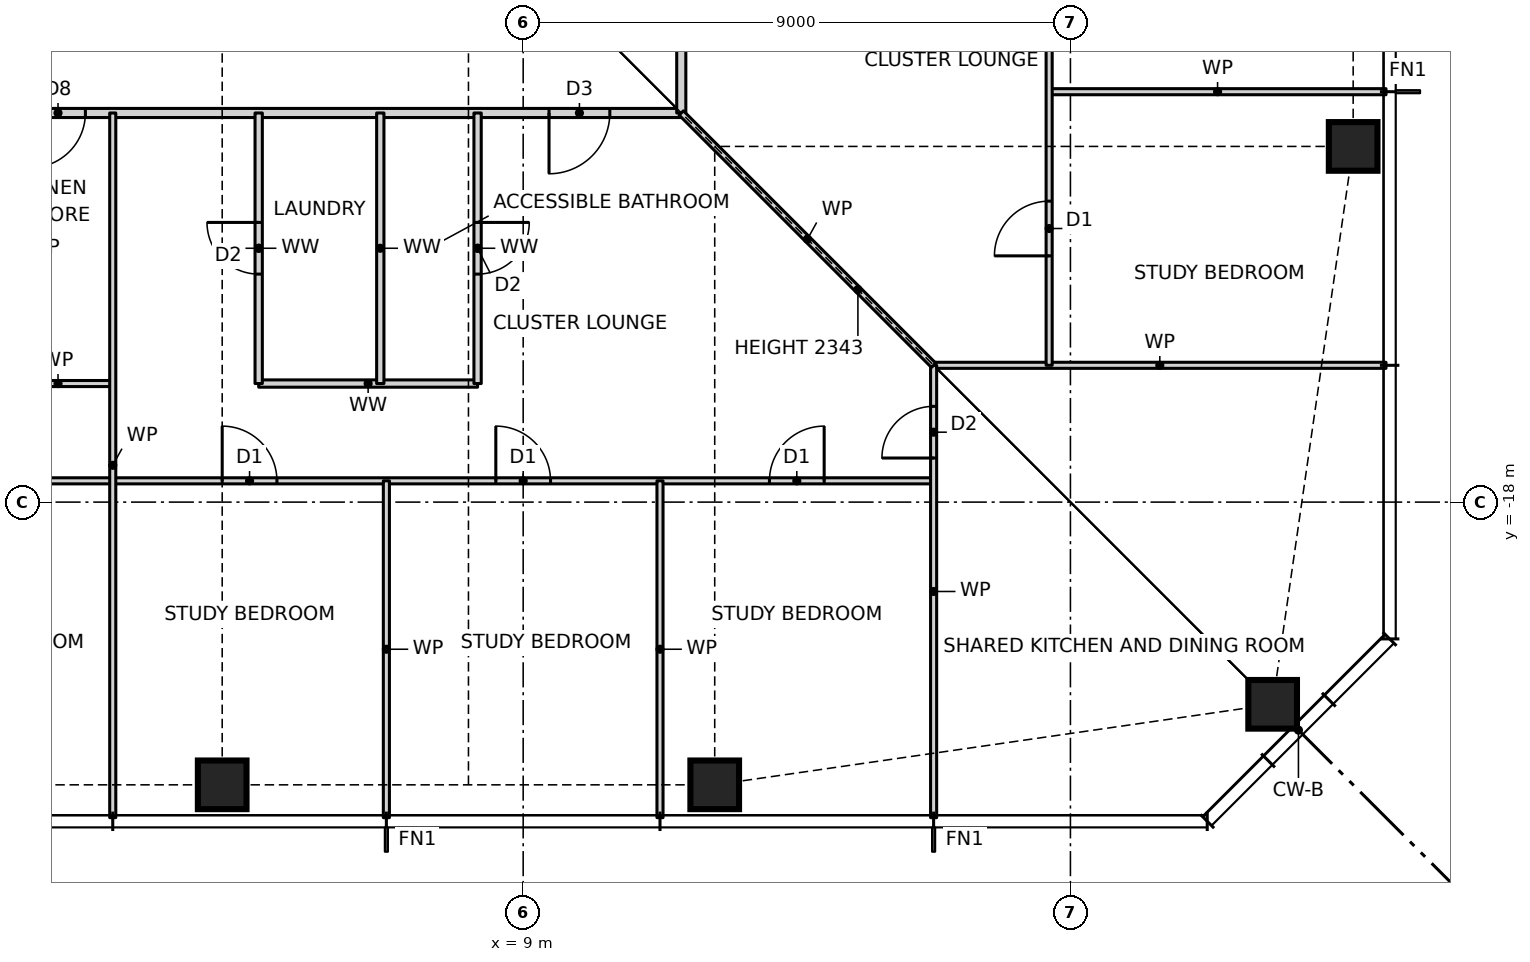
"""IFC4 building model, lengths in metres.
Left out: names, types, materials, properties, quantities, classifications, styles, units other than length and angle.
Written with IfcOpenShell. Run it as: python <this file> out.ifc"""

import sys

from ifc_helpers import new_model, si_unit, direction, frame, frame_2d, origin, origin_2d, place, context, subcontext, project, spatial, rectangle, hollow_rectangle, extrude, element, fill, save


model = new_model("IFC4")
c1 = context("Model", 3, precision=1e-05, world=origin(), true_north=direction((0.0, 1.0)))
c2 = subcontext(c1, "Body", "Model", "MODEL_VIEW")
j1 = project(units=[si_unit("LENGTHUNIT", "METRE"), si_unit("PLANEANGLEUNIT", "RADIAN")], contexts=[c1])
p1 = place(None, origin())
s1 = spatial("IfcSite", under=j1, at=p1, CompositionType="ELEMENT")
p2 = place(p1, origin())
s2 = spatial("IfcBuilding", under=s1, at=p2, CompositionType="ELEMENT")
p3 = place(p2, frame((0.0, 0.0, 60.5)))
s3 = spatial("IfcBuildingStorey", under=s2, at=p3, CompositionType="ELEMENT", Elevation=60.5)
for number, where, z_axis, x_axis in (
    (1, (4.05, -22.65, 0.0), (0.0, 0.0, 1.0), (1.0, 0.0, 0.0)),
    (2, (12.15, -22.65, 0.0), (0.0, 0.0, 1.0), (1.0, 0.0, 0.0)),
    (3, (21.326, -21.326, 0.0), (0.0, 0.0, 1.0), (1.0, 0.0, 0.0)),
    (4, (22.65, -12.15, 0.0), (0.0, 0.0, 1.0), (1.0, 0.0, 0.0)),
):
    element("IfcColumn", number, at=place(p3, frame(where, z_axis=z_axis, x_axis=x_axis)), inside=s3, PredefinedType="COLUMN", context=c2, shape_type="SweptSolid", body=[
        extrude(hollow_rectangle(XDim=0.8, YDim=0.8, WallThickness=0.09, at=origin_2d()), origin(), (0.0, 0.0, 1.0), 3.5),
    ])
p4 = place(p3, frame((-15.75, -17.65, 0.0), z_axis=(0.0, 0.0, 1.0), x_axis=(1.0, 0.0, 0.0)))
e5 = element("IfcWall", 5, at=p4, inside=s3, PredefinedType="PARTITIONING", context=c2, shape_type="SweptSolid", body=[
    extrude(rectangle(XDim=31.5, YDim=0.1, at=frame_2d((15.75, 0.0))), origin(), (0.0, 0.0, 1.0), 3.27),
])
p5 = place(p4, frame((1.8, 0.0, 0.0)))
e6 = element("IfcOpeningElement", 6, at=p5, cuts=e5, PredefinedType="OPENING", context=c2, shape_type="SweptSolid", body=[
    extrude(rectangle(XDim=0.9, YDim=2.1, at=frame_2d((0.45, 1.05))), frame((0.0, 0.06, 0.0), z_axis=(0.0, -1.0, 0.0), x_axis=(1.0, 0.0, 0.0)), (0.0, 0.0, 1.0), 0.12),
])
p6 = place(p4, frame((6.3, 0.0, 0.0)))
e7 = element("IfcOpeningElement", 7, at=p6, cuts=e5, PredefinedType="OPENING", context=c2, shape_type="SweptSolid", body=[
    extrude(rectangle(XDim=0.9, YDim=2.1, at=frame_2d((0.45, 1.05))), frame((0.0, 0.06, 0.0), z_axis=(0.0, -1.0, 0.0), x_axis=(1.0, 0.0, 0.0)), (0.0, 0.0, 1.0), 0.12),
])
p7 = place(p4, frame((10.8, 0.0, 0.0)))
e8 = element("IfcOpeningElement", 8, at=p7, cuts=e5, PredefinedType="OPENING", context=c2, shape_type="SweptSolid", body=[
    extrude(rectangle(XDim=0.9, YDim=2.1, at=frame_2d((0.45, 1.05))), frame((0.0, 0.06, 0.0), z_axis=(0.0, -1.0, 0.0), x_axis=(1.0, 0.0, 0.0)), (0.0, 0.0, 1.0), 0.12),
])
p8 = place(p4, frame((15.3, 0.0, 0.0)))
e9 = element("IfcOpeningElement", 9, at=p8, cuts=e5, PredefinedType="OPENING", context=c2, shape_type="SweptSolid", body=[
    extrude(rectangle(XDim=0.9, YDim=2.1, at=frame_2d((0.45, 1.05))), frame((0.0, 0.06, 0.0), z_axis=(0.0, -1.0, 0.0), x_axis=(1.0, 0.0, 0.0)), (0.0, 0.0, 1.0), 0.12),
])
p9 = place(p4, frame((19.8, 0.0, 0.0)))
e10 = element("IfcOpeningElement", 10, at=p9, cuts=e5, PredefinedType="OPENING", context=c2, shape_type="SweptSolid", body=[
    extrude(rectangle(XDim=0.9, YDim=2.1, at=frame_2d((0.45, 1.05))), frame((0.0, 0.06, 0.0), z_axis=(0.0, -1.0, 0.0), x_axis=(1.0, 0.0, 0.0)), (0.0, 0.0, 1.0), 0.12),
])
p10 = place(p4, frame((24.3, 0.0, 0.0)))
e11 = element("IfcOpeningElement", 11, at=p10, cuts=e5, PredefinedType="OPENING", context=c2, shape_type="SweptSolid", body=[
    extrude(rectangle(XDim=0.9, YDim=2.1, at=frame_2d((0.45, 1.05))), frame((0.0, 0.06, 0.0), z_axis=(0.0, -1.0, 0.0), x_axis=(1.0, 0.0, 0.0)), (0.0, 0.0, 1.0), 0.12),
])
p11 = place(p4, frame((28.8, 0.0, 0.0)))
e12 = element("IfcOpeningElement", 12, at=p11, cuts=e5, PredefinedType="OPENING", context=c2, shape_type="SweptSolid", body=[
    extrude(rectangle(XDim=0.9, YDim=2.1, at=frame_2d((0.45, 1.05))), frame((0.0, 0.06, 0.0), z_axis=(0.0, -1.0, 0.0), x_axis=(1.0, 0.0, 0.0)), (0.0, 0.0, 1.0), 0.12),
])
p12 = place(p3, frame((0.45, -16.05, 0.0), z_axis=(0.0, 0.0, 1.0), x_axis=(1.0, 0.0, 0.0)))
e13 = element("IfcWall", 13, at=p12, inside=s3, PredefinedType="PARTITIONING", context=c2, shape_type="SweptSolid", body=[
    extrude(rectangle(XDim=1.8, YDim=0.1, at=frame_2d((0.9, 0.0))), origin(), (0.0, 0.0, 1.0), 3.27),
])
p13 = place(p3, frame((4.65, -16.05, 0.0), z_axis=(0.0, 0.0, 1.0), x_axis=(1.0, 0.0, 0.0)))
e14 = element("IfcWall", 14, at=p13, inside=s3, PredefinedType="PARTITIONING", context=c2, shape_type="SweptSolid", body=[
    extrude(rectangle(XDim=3.6, YDim=0.12, at=frame_2d((1.8, 0.0))), origin(), (0.0, 0.0, 1.0), 3.27),
])
p14 = place(p3, frame((15.75, -15.75, 0.0), z_axis=(0.0, 0.0, 1.0), x_axis=(1.0, 0.0, 0.0)))
e15 = element("IfcWall", 15, at=p14, inside=s3, PredefinedType="PARTITIONING", context=c2, shape_type="SweptSolid", body=[
    extrude(rectangle(XDim=7.44, YDim=0.1, at=frame_2d((3.72, 0.0))), origin(), (0.0, 0.0, 1.0), 3.27),
])
p15 = place(p3, frame((-11.6, -11.6, 0.0), z_axis=(0.0, 0.0, 1.0), x_axis=(1.0, 0.0, 0.0)))
e16 = element("IfcWall", 16, at=p15, inside=s3, PredefinedType="PARTITIONING", context=c2, shape_type="SweptSolid", body=[
    extrude(rectangle(XDim=23.2, YDim=0.15, at=frame_2d((11.6, 0.0))), origin(), (0.0, 0.0, 1.0), 3.27),
])
p16 = place(p15, frame((2.655, 0.0, 0.0)))
e17 = element("IfcOpeningElement", 17, at=p16, cuts=e16, PredefinedType="OPENING", context=c2, shape_type="SweptSolid", body=[
    extrude(rectangle(XDim=1.0, YDim=2.1, at=frame_2d((0.5, 1.05))), frame((0.0, 0.085, 0.0), z_axis=(0.0, -1.0, 0.0), x_axis=(1.0, 0.0, 0.0)), (0.0, 0.0, 1.0), 0.17),
])
p17 = place(p15, frame((12.5, 0.0, 0.0)))
e18 = element("IfcOpeningElement", 18, at=p17, cuts=e16, PredefinedType="OPENING", context=c2, shape_type="SweptSolid", body=[
    extrude(rectangle(XDim=0.9, YDim=2.1, at=frame_2d((0.45, 1.05))), frame((0.0, 0.085, 0.0), z_axis=(0.0, -1.0, 0.0), x_axis=(1.0, 0.0, 0.0)), (0.0, 0.0, 1.0), 0.17),
])
p18 = place(p15, frame((21.025, 0.0, 0.0)))
e19 = element("IfcOpeningElement", 19, at=p18, cuts=e16, PredefinedType="OPENING", context=c2, shape_type="SweptSolid", body=[
    extrude(rectangle(XDim=1.0, YDim=2.1, at=frame_2d((0.5, 1.05))), frame((0.0, 0.085, 0.0), z_axis=(0.0, -1.0, 0.0), x_axis=(1.0, 0.0, 0.0)), (0.0, 0.0, 1.0), 0.17),
])
p19 = place(p3, frame((17.65, -11.25, 0.0), z_axis=(0.0, 0.0, 1.0), x_axis=(1.0, 0.0, 0.0)))
e20 = element("IfcWall", 20, at=p19, inside=s3, PredefinedType="PARTITIONING", context=c2, shape_type="SweptSolid", body=[
    extrude(rectangle(XDim=5.54, YDim=0.1, at=frame_2d((2.77, 0.0))), origin(), (0.0, 0.0, 1.0), 3.27),
])
p20 = place(p3, frame((17.65, -15.75, 0.0), z_axis=(0.0, 0.0, 1.0), x_axis=(0.0, 1.0, 0.0)))
e21 = element("IfcWall", 21, at=p20, inside=s3, PredefinedType="PARTITIONING", context=c2, shape_type="SweptSolid", body=[
    extrude(rectangle(XDim=27.0, YDim=0.1, at=frame_2d((13.5, 0.0))), origin(), (0.0, 0.0, 1.0), 3.27),
])
p21 = place(p20, frame((1.8, 0.0, 0.0)))
e22 = element("IfcOpeningElement", 22, at=p21, cuts=e21, PredefinedType="OPENING", context=c2, shape_type="SweptSolid", body=[
    extrude(rectangle(XDim=0.9, YDim=2.1, at=frame_2d((0.45, 1.05))), frame((0.0, 0.06, 0.0), z_axis=(0.0, -1.0, 0.0), x_axis=(1.0, 0.0, 0.0)), (0.0, 0.0, 1.0), 0.12),
])
p22 = place(p20, frame((6.3, 0.0, 0.0)))
e23 = element("IfcOpeningElement", 23, at=p22, cuts=e21, PredefinedType="OPENING", context=c2, shape_type="SweptSolid", body=[
    extrude(rectangle(XDim=0.9, YDim=2.1, at=frame_2d((0.45, 1.05))), frame((0.0, 0.06, 0.0), z_axis=(0.0, -1.0, 0.0), x_axis=(1.0, 0.0, 0.0)), (0.0, 0.0, 1.0), 0.12),
])
p23 = place(p20, frame((10.8, 0.0, 0.0)))
e24 = element("IfcOpeningElement", 24, at=p23, cuts=e21, PredefinedType="OPENING", context=c2, shape_type="SweptSolid", body=[
    extrude(rectangle(XDim=0.9, YDim=2.1, at=frame_2d((0.45, 1.05))), frame((0.0, 0.06, 0.0), z_axis=(0.0, -1.0, 0.0), x_axis=(1.0, 0.0, 0.0)), (0.0, 0.0, 1.0), 0.12),
])
p24 = place(p20, frame((15.3, 0.0, 0.0)))
e25 = element("IfcOpeningElement", 25, at=p24, cuts=e21, PredefinedType="OPENING", context=c2, shape_type="SweptSolid", body=[
    extrude(rectangle(XDim=0.9, YDim=2.1, at=frame_2d((0.45, 1.05))), frame((0.0, 0.06, 0.0), z_axis=(0.0, -1.0, 0.0), x_axis=(1.0, 0.0, 0.0)), (0.0, 0.0, 1.0), 0.12),
])
p25 = place(p20, frame((19.8, 0.0, 0.0)))
e26 = element("IfcOpeningElement", 26, at=p25, cuts=e21, PredefinedType="OPENING", context=c2, shape_type="SweptSolid", body=[
    extrude(rectangle(XDim=0.9, YDim=2.1, at=frame_2d((0.45, 1.05))), frame((0.0, 0.06, 0.0), z_axis=(0.0, -1.0, 0.0), x_axis=(1.0, 0.0, 0.0)), (0.0, 0.0, 1.0), 0.12),
])
p26 = place(p20, frame((24.3, 0.0, 0.0)))
e27 = element("IfcOpeningElement", 27, at=p26, cuts=e21, PredefinedType="OPENING", context=c2, shape_type="SweptSolid", body=[
    extrude(rectangle(XDim=0.9, YDim=2.1, at=frame_2d((0.45, 1.05))), frame((0.0, 0.06, 0.0), z_axis=(0.0, -1.0, 0.0), x_axis=(1.0, 0.0, 0.0)), (0.0, 0.0, 1.0), 0.12),
])
p27 = place(p3, frame((15.75, -23.19, 0.0), z_axis=(0.0, 0.0, 1.0), x_axis=(0.0, 1.0, 0.0)))
e28 = element("IfcWall", 28, at=p27, inside=s3, PredefinedType="PARTITIONING", context=c2, shape_type="SweptSolid", body=[
    extrude(rectangle(XDim=7.44, YDim=0.1, at=frame_2d((3.72, 0.0))), origin(), (0.0, 0.0, 1.0), 3.27),
])
p28 = place(p27, frame((5.915, 0.0, 0.0)))
e29 = element("IfcOpeningElement", 29, at=p28, cuts=e28, PredefinedType="OPENING", context=c2, shape_type="SweptSolid", body=[
    extrude(rectangle(XDim=0.85, YDim=2.1, at=frame_2d((0.425, 1.05))), frame((0.0, 0.06, 0.0), z_axis=(0.0, -1.0, 0.0), x_axis=(1.0, 0.0, 0.0)), (0.0, 0.0, 1.0), 0.12),
])
p29 = place(p3, frame((11.6, -11.6, 0.0), z_axis=(0.0, 0.0, 1.0), x_axis=(0.0, 1.0, 0.0)))
e30 = element("IfcWall", 30, at=p29, inside=s3, PredefinedType="PARTITIONING", context=c2, shape_type="SweptSolid", body=[
    extrude(rectangle(XDim=24.2, YDim=0.15, at=frame_2d((12.1, 0.0))), origin(), (0.0, 0.0, 1.0), 3.27),
])
p30 = place(p29, frame((16.05, 0.0, 0.0)))
e31 = element("IfcOpeningElement", 31, at=p30, cuts=e30, PredefinedType="OPENING", context=c2, shape_type="SweptSolid", body=[
    extrude(rectangle(XDim=1.0, YDim=2.1, at=frame_2d((0.5, 1.05))), frame((0.0, 0.085, 0.0), z_axis=(0.0, -1.0, 0.0), x_axis=(1.0, 0.0, 0.0)), (0.0, 0.0, 1.0), 0.17),
])
p31 = place(p3, frame((11.25, -23.19, 0.0), z_axis=(0.0, 0.0, 1.0), x_axis=(0.0, 1.0, 0.0)))
e32 = element("IfcWall", 32, at=p31, inside=s3, PredefinedType="PARTITIONING", context=c2, shape_type="SweptSolid", body=[
    extrude(rectangle(XDim=5.54, YDim=0.1, at=frame_2d((2.77, 0.0))), origin(), (0.0, 0.0, 1.0), 3.27),
])
p32 = place(p3, frame((8.25, -16.05, 0.0), z_axis=(0.0, 0.0, 1.0), x_axis=(0.0, 1.0, 0.0)))
e33 = element("IfcWall", 33, at=p32, inside=s3, PredefinedType="PARTITIONING", context=c2, shape_type="SweptSolid", body=[
    extrude(rectangle(XDim=4.45, YDim=0.12, at=frame_2d((2.225, 0.0))), origin(), (0.0, 0.0, 1.0), 3.27),
])
p33 = place(p32, frame((1.8, 0.0, 0.0)))
e34 = element("IfcOpeningElement", 34, at=p33, cuts=e33, PredefinedType="OPENING", context=c2, shape_type="SweptSolid", body=[
    extrude(rectangle(XDim=0.85, YDim=2.1, at=frame_2d((0.425, 1.05))), frame((0.0, 0.07, 0.0), z_axis=(0.0, -1.0, 0.0), x_axis=(1.0, 0.0, 0.0)), (0.0, 0.0, 1.0), 0.14),
])
p34 = place(p3, frame((6.75, -23.19, 0.0), z_axis=(0.0, 0.0, 1.0), x_axis=(0.0, 1.0, 0.0)))
e35 = element("IfcWall", 35, at=p34, inside=s3, PredefinedType="PARTITIONING", context=c2, shape_type="SweptSolid", body=[
    extrude(rectangle(XDim=5.54, YDim=0.1, at=frame_2d((2.77, 0.0))), origin(), (0.0, 0.0, 1.0), 3.27),
])
p35 = place(p3, frame((6.65, -16.05, 0.0), z_axis=(0.0, 0.0, 1.0), x_axis=(0.0, 1.0, 0.0)))
e36 = element("IfcWall", 36, at=p35, inside=s3, PredefinedType="PARTITIONING", context=c2, shape_type="SweptSolid", body=[
    extrude(rectangle(XDim=4.45, YDim=0.12, at=frame_2d((2.225, 0.0))), origin(), (0.0, 0.0, 1.0), 3.27),
])
p36 = place(p3, frame((4.65, -16.05, 0.0), z_axis=(0.0, 0.0, 1.0), x_axis=(0.0, 1.0, 0.0)))
e37 = element("IfcWall", 37, at=p36, inside=s3, PredefinedType="PARTITIONING", context=c2, shape_type="SweptSolid", body=[
    extrude(rectangle(XDim=4.45, YDim=0.12, at=frame_2d((2.225, 0.0))), origin(), (0.0, 0.0, 1.0), 3.27),
])
p37 = place(p36, frame((1.8, 0.0, 0.0)))
e38 = element("IfcOpeningElement", 38, at=p37, cuts=e37, PredefinedType="OPENING", context=c2, shape_type="SweptSolid", body=[
    extrude(rectangle(XDim=0.85, YDim=2.1, at=frame_2d((0.425, 1.05))), frame((0.0, 0.07, 0.0), z_axis=(0.0, -1.0, 0.0), x_axis=(1.0, 0.0, 0.0)), (0.0, 0.0, 1.0), 0.14),
])
p38 = place(p3, frame((2.25, -23.19, 0.0), z_axis=(0.0, 0.0, 1.0), x_axis=(0.0, 1.0, 0.0)))
e39 = element("IfcWall", 39, at=p38, inside=s3, PredefinedType="PARTITIONING", context=c2, shape_type="SweptSolid", body=[
    extrude(rectangle(XDim=11.59, YDim=0.1, at=frame_2d((5.795, 0.0))), origin(), (0.0, 0.0, 1.0), 3.27),
])
p39 = place(p3, frame((15.75, -15.75, 0.0), z_axis=(0.0, 0.0, 1.0), x_axis=(-0.707106781187, 0.707106781187, 0.0)))
e40 = element("IfcWall", 40, at=p39, inside=s3, PredefinedType="PARTITIONING", context=c2, shape_type="SweptSolid", body=[
    extrude(rectangle(XDim=5.869, YDim=0.1, at=frame_2d((2.935, 0.0))), origin(), (0.0, 0.0, 1.0), 2.343),
])
p40 = place(p17, frame((0.9, 0.0, 0.0), z_axis=(0.0, 0.0, 1.0), x_axis=(-1.0, 0.0, 0.0)))
e41 = element("IfcDoor", 41, at=p40, inside=s3, OperationType="SINGLE_SWING_RIGHT", PredefinedType="DOOR", context=c2, shape_type="SweptSolid", body=[
    extrude(rectangle(XDim=0.9, YDim=2.1, at=frame_2d((0.45, 1.05))), frame((0.0, 0.025, 0.0), z_axis=(0.0, -1.0, 0.0), x_axis=(1.0, 0.0, 0.0)), (0.0, 0.0, 1.0), 0.05),
])
fill(e18, e41)
p41 = place(p9, origin())
e42 = element("IfcDoor", 42, at=p41, inside=s3, OperationType="SINGLE_SWING_LEFT", PredefinedType="DOOR", context=c2, shape_type="SweptSolid", body=[
    extrude(rectangle(XDim=0.9, YDim=2.1, at=frame_2d((0.45, 1.05))), frame((0.0, 0.025, 0.0), z_axis=(0.0, -1.0, 0.0), x_axis=(1.0, 0.0, 0.0)), (0.0, 0.0, 1.0), 0.05),
])
fill(e10, e42)
p42 = place(p10, origin())
e43 = element("IfcDoor", 43, at=p42, inside=s3, OperationType="SINGLE_SWING_LEFT", PredefinedType="DOOR", context=c2, shape_type="SweptSolid", body=[
    extrude(rectangle(XDim=0.9, YDim=2.1, at=frame_2d((0.45, 1.05))), frame((0.0, 0.025, 0.0), z_axis=(0.0, -1.0, 0.0), x_axis=(1.0, 0.0, 0.0)), (0.0, 0.0, 1.0), 0.05),
])
fill(e11, e43)
p43 = place(p11, origin())
e44 = element("IfcDoor", 44, at=p43, inside=s3, OperationType="SINGLE_SWING_RIGHT", PredefinedType="DOOR", context=c2, shape_type="SweptSolid", body=[
    extrude(rectangle(XDim=0.9, YDim=2.1, at=frame_2d((0.45, 1.05))), frame((0.0, 0.025, 0.0), z_axis=(0.0, -1.0, 0.0), x_axis=(1.0, 0.0, 0.0)), (0.0, 0.0, 1.0), 0.05),
])
fill(e12, e44)
p44 = place(p18, frame((1.0, 0.0, 0.0), z_axis=(0.0, 0.0, 1.0), x_axis=(-1.0, 0.0, 0.0)))
e45 = element("IfcDoor", 45, at=p44, inside=s3, OperationType="SINGLE_SWING_RIGHT", PredefinedType="DOOR", context=c2, shape_type="SweptSolid", body=[
    extrude(rectangle(XDim=1.0, YDim=2.1, at=frame_2d((0.5, 1.05))), frame((0.0, 0.025, 0.0), z_axis=(0.0, -1.0, 0.0), x_axis=(1.0, 0.0, 0.0)), (0.0, 0.0, 1.0), 0.05),
])
fill(e19, e45)
p45 = place(p37, origin())
e46 = element("IfcDoor", 46, at=p45, inside=s3, OperationType="SINGLE_SWING_RIGHT", PredefinedType="DOOR", context=c2, shape_type="SweptSolid", body=[
    extrude(rectangle(XDim=0.85, YDim=2.1, at=frame_2d((0.425, 1.05))), frame((0.0, 0.025, 0.0), z_axis=(0.0, -1.0, 0.0), x_axis=(1.0, 0.0, 0.0)), (0.0, 0.0, 1.0), 0.05),
])
fill(e38, e46)
p46 = place(p33, frame((0.85, 0.0, 0.0), z_axis=(0.0, 0.0, 1.0), x_axis=(-1.0, 0.0, 0.0)))
e47 = element("IfcDoor", 47, at=p46, inside=s3, OperationType="SINGLE_SWING_LEFT", PredefinedType="DOOR", context=c2, shape_type="SweptSolid", body=[
    extrude(rectangle(XDim=0.85, YDim=2.1, at=frame_2d((0.425, 1.05))), frame((0.0, 0.025, 0.0), z_axis=(0.0, -1.0, 0.0), x_axis=(1.0, 0.0, 0.0)), (0.0, 0.0, 1.0), 0.05),
])
fill(e34, e47)
p47 = place(p21, origin())
e48 = element("IfcDoor", 48, at=p47, inside=s3, OperationType="SINGLE_SWING_LEFT", PredefinedType="DOOR", context=c2, shape_type="SweptSolid", body=[
    extrude(rectangle(XDim=0.9, YDim=2.1, at=frame_2d((0.45, 1.05))), frame((0.0, 0.025, 0.0), z_axis=(0.0, -1.0, 0.0), x_axis=(1.0, 0.0, 0.0)), (0.0, 0.0, 1.0), 0.05),
])
fill(e22, e48)
p48 = place(p28, origin())
e49 = element("IfcDoor", 49, at=p48, inside=s3, OperationType="SINGLE_SWING_LEFT", PredefinedType="DOOR", context=c2, shape_type="SweptSolid", body=[
    extrude(rectangle(XDim=0.85, YDim=2.1, at=frame_2d((0.425, 1.05))), frame((0.0, 0.025, 0.0), z_axis=(0.0, -1.0, 0.0), x_axis=(1.0, 0.0, 0.0)), (0.0, 0.0, 1.0), 0.05),
])
fill(e29, e49)
save(model, sys.argv[1])
